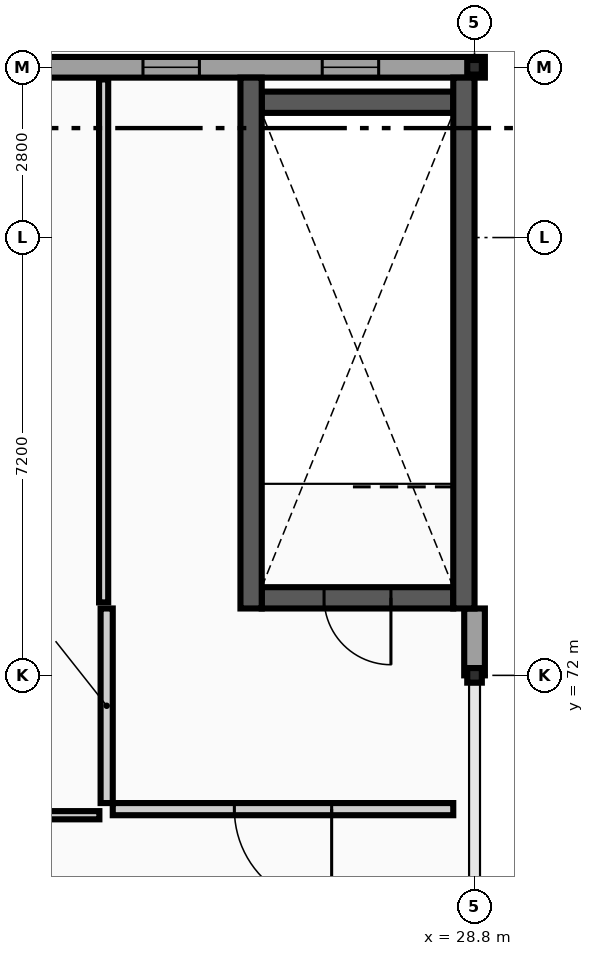
"""IFC4 building model, lengths in metres.
Left out: names, types, materials, properties, quantities, classifications, styles, units other than length and angle.
Written with IfcOpenShell. Run it as: python <this file> out.ifc"""

import sys

from ifc_helpers import new_model, si_unit, direction, frame, frame_2d, origin, origin_2d, place, context, subcontext, project, spatial, rectangle, i_section, extrude, element, fill, save


model = new_model("IFC4")
c1 = context("Model", 3, precision=1e-05, world=origin(), true_north=direction((0.0, 1.0)))
c2 = subcontext(c1, "Body", "Model", "MODEL_VIEW")
j1 = project(units=[si_unit("LENGTHUNIT", "METRE"), si_unit("PLANEANGLEUNIT", "RADIAN")], contexts=[c1])
p1 = place(None, origin())
s1 = spatial("IfcSite", under=j1, at=p1, CompositionType="ELEMENT")
p2 = place(p1, origin())
s2 = spatial("IfcBuilding", under=s1, at=p2, CompositionType="ELEMENT")
p3 = place(p2, frame((0.0, 0.0, 14.0)))
s3 = spatial("IfcBuildingStorey", under=s2, at=p3, CompositionType="ELEMENT", Elevation=14.0)
for number, where, z_axis, x_axis in (
    (1, (28.8, 72.0, 0.0), (0.0, 0.0, 1.0), (1.0, 0.0, 0.0)),
    (2, (28.8, 82.0, 0.0), (0.0, 0.0, 1.0), (1.0, 0.0, 0.0)),
):
    element("IfcColumn", number, at=place(p3, frame(where, z_axis=z_axis, x_axis=x_axis)), inside=s3, PredefinedType="COLUMN", context=c2, shape_type="SweptSolid", body=[
        extrude(i_section(OverallWidth=0.24, OverallDepth=0.24, WebThickness=0.01, FlangeThickness=0.017, FilletRadius=0.021, at=origin_2d()), origin(), (0.0, 0.0, 1.0), 4.4),
    ])
p4 = place(p3, frame((28.97, 82.0, 0.0), z_axis=(0.0, 0.0, 1.0), x_axis=(-1.0, 0.0, 0.0)))
e3 = element("IfcWall", 3, at=p4, inside=s3, PredefinedType="STANDARD", context=c2, shape_type="SweptSolid", body=[
    extrude(rectangle(XDim=7.37, YDim=0.34, at=frame_2d((3.685, 0.0))), origin(), (0.0, 0.0, 1.0), 4.035),
])
p5 = place(p4, frame((1.747, 0.0, 0.95)))
e4 = element("IfcOpeningElement", 4, at=p5, cuts=e3, PredefinedType="OPENING", context=c2, shape_type="SweptSolid", body=[
    extrude(rectangle(XDim=0.928, YDim=1.332, at=frame_2d((0.464, 0.666))), frame((0.0, 0.18, 0.0), z_axis=(0.0, -1.0, 0.0), x_axis=(1.0, 0.0, 0.0)), (0.0, 0.0, 1.0), 0.36),
])
p6 = place(p4, frame((4.695, 0.0, 0.95)))
e5 = element("IfcOpeningElement", 5, at=p6, cuts=e3, PredefinedType="OPENING", context=c2, shape_type="SweptSolid", body=[
    extrude(rectangle(XDim=0.928, YDim=1.332, at=frame_2d((0.464, 0.666))), frame((0.0, 0.18, 0.0), z_axis=(0.0, -1.0, 0.0), x_axis=(1.0, 0.0, 0.0)), (0.0, 0.0, 1.0), 0.36),
])
p7 = place(p3, frame((28.8, 72.0, 0.0), z_axis=(0.0, 0.0, 1.0), x_axis=(0.0, 1.0, 0.0)))
e6 = element("IfcWall", 6, at=p7, inside=s3, PredefinedType="STANDARD", context=c2, shape_type="SweptSolid", body=[
    extrude(rectangle(XDim=1.1, YDim=0.34, at=frame_2d((0.55, 0.0))), origin(), (0.0, 0.0, 1.0), 4.11),
])
p8 = place(p3, frame((25.3, 73.275, 0.0), z_axis=(0.0, 0.0, 1.0), x_axis=(1.0, 0.0, 0.0)))
e7 = element("IfcWall", 7, at=p8, inside=s3, PredefinedType="SHEAR", context=c2, shape_type="SweptSolid", body=[
    extrude(rectangle(XDim=3.15, YDim=0.35, at=frame_2d((1.575, 0.0))), origin(), (0.0, 0.0, 1.0), 4.18),
])
p9 = place(p8, frame((1.025, 0.0, 0.0)))
e8 = element("IfcOpeningElement", 8, at=p9, cuts=e7, PredefinedType="OPENING", context=c2, shape_type="SweptSolid", body=[
    extrude(rectangle(XDim=1.1, YDim=2.15, at=frame_2d((0.55, 1.075))), frame((0.0, 0.185, 0.0), z_axis=(0.0, -1.0, 0.0), x_axis=(1.0, 0.0, 0.0)), (0.0, 0.0, 1.0), 0.37),
])
p10 = place(p3, frame((25.3, 81.425, 0.0), z_axis=(0.0, 0.0, 1.0), x_axis=(1.0, 0.0, 0.0)))
e9 = element("IfcWall", 9, at=p10, inside=s3, PredefinedType="SHEAR", context=c2, shape_type="SweptSolid", body=[
    extrude(rectangle(XDim=3.15, YDim=0.35, at=frame_2d((1.575, 0.0))), origin(), (0.0, 0.0, 1.0), 4.18),
])
for number, where, z_axis, x_axis in (
    (10, (25.125, 73.1, 0.0), (0.0, 0.0, 1.0), (0.0, 1.0, 0.0)),
    (11, (28.625, 73.1, 0.0), (0.0, 0.0, 1.0), (0.0, 1.0, 0.0)),
):
    element("IfcWall", number, at=place(p3, frame(where, z_axis=z_axis, x_axis=x_axis)), inside=s3, PredefinedType="SHEAR", context=c2, shape_type="SweptSolid", body=[
        extrude(rectangle(XDim=8.73, YDim=0.35, at=frame_2d((4.365, 0.0))), origin(), (0.0, 0.0, 1.0), 4.18),
    ])
p11 = place(p3, frame((22.85, 69.8, 0.0), z_axis=(0.0, 0.0, 1.0), x_axis=(1.0, 0.0, 0.0)))
e12 = element("IfcWall", 12, at=p11, inside=s3, PredefinedType="PARTITIONING", context=c2, shape_type="SweptSolid", body=[
    extrude(rectangle(XDim=5.6, YDim=0.2, at=frame_2d((2.8, 0.0))), origin(), (0.0, 0.0, 1.0), 4.18),
])
p12 = place(p11, frame((2.0, 0.0, 0.0)))
e13 = element("IfcOpeningElement", 13, at=p12, cuts=e12, PredefinedType="OPENING", context=c2, shape_type="SweptSolid", body=[
    extrude(rectangle(XDim=1.6, YDim=2.2, at=frame_2d((0.8, 1.1))), frame((0.0, 0.11, 0.0), z_axis=(0.0, -1.0, 0.0), x_axis=(1.0, 0.0, 0.0)), (0.0, 0.0, 1.0), 0.22),
])
p13 = place(p3, frame((22.75, 69.9, 0.0), z_axis=(0.0, 0.0, 1.0), x_axis=(0.0, 1.0, 0.0)))
e14 = element("IfcWall", 14, at=p13, inside=s3, PredefinedType="PARTITIONING", context=c2, shape_type="SweptSolid", body=[
    extrude(rectangle(XDim=3.2, YDim=0.2, at=frame_2d((1.6, 0.0))), origin(), (0.0, 0.0, 1.0), 4.18),
])
p14 = place(p3, frame((6.45, 69.7, 0.0), z_axis=(0.0, 0.0, 1.0), x_axis=(1.0, 0.0, 0.0)))
e15 = element("IfcWall", 15, at=p14, inside=s3, PredefinedType="PARTITIONING", context=c2, shape_type="SweptSolid", body=[
    extrude(rectangle(XDim=16.18, YDim=0.135, at=frame_2d((8.09, 0.0))), origin(), (0.0, 0.0, 1.0), 4.18),
])
p15 = place(p14, frame((10.664, 0.0, 0.0)))
e16 = element("IfcOpeningElement", 16, at=p15, cuts=e15, PredefinedType="OPENING", context=c2, shape_type="SweptSolid", body=[
    extrude(rectangle(XDim=1.036, YDim=2.04, at=frame_2d((0.518, 1.02))), frame((0.0, 0.078, 0.0), z_axis=(0.0, -1.0, 0.0), x_axis=(1.0, 0.0, 0.0)), (0.0, 0.0, 1.0), 0.155),
])
p16 = place(p14, frame((5.65, 0.0, 0.0)))
e17 = element("IfcOpeningElement", 17, at=p16, cuts=e15, PredefinedType="OPENING", context=c2, shape_type="SweptSolid", body=[
    extrude(rectangle(XDim=1.062, YDim=2.04, at=frame_2d((0.531, 1.02))), frame((0.0, 0.078, 0.0), z_axis=(0.0, -1.0, 0.0), x_axis=(1.0, 0.0, 0.0)), (0.0, 0.0, 1.0), 0.155),
])
p17 = place(p14, frame((12.6, 0.0, 0.0)))
e18 = element("IfcOpeningElement", 18, at=p17, cuts=e15, PredefinedType="OPENING", context=c2, shape_type="SweptSolid", body=[
    extrude(rectangle(XDim=1.088, YDim=2.04, at=frame_2d((0.544, 1.02))), frame((0.0, 0.078, 0.0), z_axis=(0.0, -1.0, 0.0), x_axis=(1.0, 0.0, 0.0)), (0.0, 0.0, 1.0), 0.155),
])
p18 = place(p14, frame((3.61, 0.0, 0.0)))
e19 = element("IfcOpeningElement", 19, at=p18, cuts=e15, PredefinedType="OPENING", context=c2, shape_type="SweptSolid", body=[
    extrude(rectangle(XDim=1.14, YDim=2.04, at=frame_2d((0.57, 1.02))), frame((0.0, 0.078, 0.0), z_axis=(0.0, -1.0, 0.0), x_axis=(1.0, 0.0, 0.0)), (0.0, 0.0, 1.0), 0.155),
])
p19 = place(p3, frame((22.7, 73.2, 0.0), z_axis=(0.0, 0.0, 1.0), x_axis=(0.0, 1.0, 0.0)))
e20 = element("IfcWall", 20, at=p19, inside=s3, PredefinedType="PARTITIONING", context=c2, shape_type="SweptSolid", body=[
    extrude(rectangle(XDim=8.6, YDim=0.15, at=frame_2d((4.3, 0.0))), origin(), (0.0, 0.0, 1.0), 4.18),
])
p20 = place(p5, origin())
e21 = element("IfcWindow", 21, at=p20, inside=s3, PartitioningType="SINGLE_PANEL", PredefinedType="WINDOW", context=c2, shape_type="SweptSolid", body=[
    extrude(rectangle(XDim=0.928, YDim=1.332, at=frame_2d((0.464, 0.666))), frame((0.0, 0.03, 0.0), z_axis=(0.0, -1.0, 0.0), x_axis=(1.0, 0.0, 0.0)), (0.0, 0.0, 1.0), 0.06),
])
fill(e4, e21)
p21 = place(p6, origin())
e22 = element("IfcWindow", 22, at=p21, inside=s3, PartitioningType="SINGLE_PANEL", PredefinedType="WINDOW", context=c2, shape_type="SweptSolid", body=[
    extrude(rectangle(XDim=0.928, YDim=1.332, at=frame_2d((0.464, 0.666))), frame((0.0, 0.03, 0.0), z_axis=(0.0, -1.0, 0.0), x_axis=(1.0, 0.0, 0.0)), (0.0, 0.0, 1.0), 0.06),
])
fill(e5, e22)
p22 = place(p9, origin())
e23 = element("IfcDoor", 23, at=p22, inside=s3, OperationType="SINGLE_SWING_RIGHT", PredefinedType="DOOR", context=c2, shape_type="SweptSolid", body=[
    extrude(rectangle(XDim=1.1, YDim=2.15, at=frame_2d((0.55, 1.075))), frame((0.0, 0.025, 0.0), z_axis=(0.0, -1.0, 0.0), x_axis=(1.0, 0.0, 0.0)), (0.0, 0.0, 1.0), 0.05),
])
fill(e8, e23)
p23 = place(p12, origin())
e24 = element("IfcDoor", 24, at=p23, inside=s3, OperationType="DOUBLE_DOOR_SINGLE_SWING", PredefinedType="DOOR", context=c2, shape_type="SweptSolid", body=[
    extrude(rectangle(XDim=1.6, YDim=2.2, at=frame_2d((0.8, 1.1))), frame((0.0, 0.025, 0.0), z_axis=(0.0, -1.0, 0.0), x_axis=(1.0, 0.0, 0.0)), (0.0, 0.0, 1.0), 0.05),
])
fill(e13, e24)
save(model, sys.argv[1])
